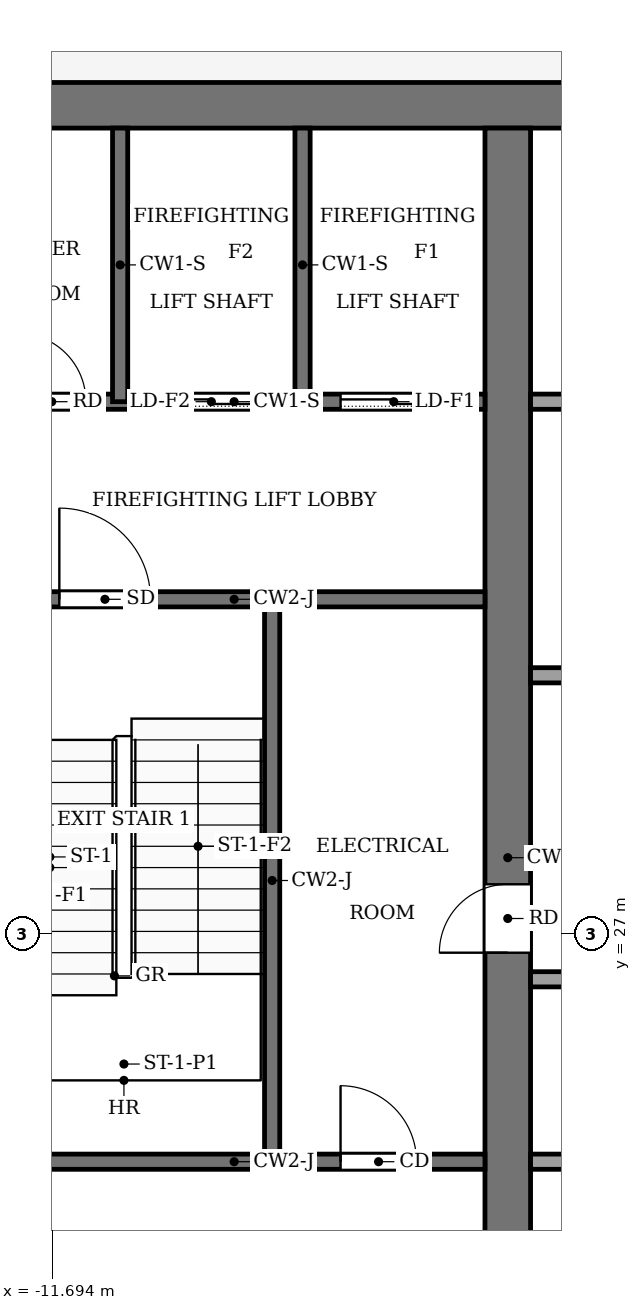
"""IFC4 building model, lengths in metres.
Left out: names, types, materials, properties, quantities, classifications, styles, units other than length and angle.
Written with IfcOpenShell. Run it as: python <this file> out.ifc"""

import sys

from ifc_helpers import new_model, si_unit, direction, frame, frame_2d, origin, place, context, subcontext, project, spatial, rectangle, extrude, element, fill, save


model = new_model("IFC4")
c1 = context("Model", 3, precision=1e-05, world=origin(), true_north=direction((0.0, 1.0)))
c2 = subcontext(c1, "Body", "Model", "MODEL_VIEW")
j1 = project(units=[si_unit("LENGTHUNIT", "METRE"), si_unit("PLANEANGLEUNIT", "RADIAN")], contexts=[c1])
p1 = place(None, origin())
s1 = spatial("IfcSite", under=j1, at=p1, CompositionType="ELEMENT")
p2 = place(p1, origin())
s2 = spatial("IfcBuilding", under=s1, at=p2, CompositionType="ELEMENT")
p3 = place(p2, frame((0.0, 0.0, 359.5)))
s3 = spatial("IfcBuildingStorey", under=s2, at=p3, CompositionType="ELEMENT", Elevation=359.5)
p4 = place(p3, frame((-13.2, 37.9, -0.15), z_axis=(0.0, 0.0, 1.0), x_axis=(1.0, 0.0, 0.0)))
e1 = element("IfcWall", 1, at=p4, inside=s3, PredefinedType="SHEAR", context=c2, shape_type="SweptSolid", body=[
    extrude(rectangle(XDim=26.4, YDim=0.6, at=frame_2d((13.2, 0.0))), origin(), (0.0, 0.0, 1.0), 4.5),
])
p5 = place(p3, frame((-5.7, 18.4, -0.15), z_axis=(0.0, 0.0, 1.0), x_axis=(0.0, 1.0, 0.0)))
e2 = element("IfcWall", 2, at=p5, inside=s3, PredefinedType="SHEAR", context=c2, shape_type="SweptSolid", body=[
    extrude(rectangle(XDim=19.2, YDim=0.6, at=frame_2d((9.6, 0.0))), origin(), (0.0, 0.0, 1.0), 4.5),
])
p6 = place(p5, frame((8.35, 0.0, 0.15)))
e3 = element("IfcOpeningElement", 3, at=p6, cuts=e2, PredefinedType="OPENING", context=c2, shape_type="SweptSolid", body=[
    extrude(rectangle(XDim=0.9, YDim=2.1, at=frame_2d((0.45, 1.05))), frame((0.0, 0.31, 0.0), z_axis=(0.0, -1.0, 0.0), x_axis=(1.0, 0.0, 0.0)), (0.0, 0.0, 1.0), 0.62),
])
p7 = place(p3, frame((-12.6, 24.0, 0.0), z_axis=(0.0, 0.0, 1.0), x_axis=(1.0, 0.0, 0.0)))
e4 = element("IfcWall", 4, at=p7, inside=s3, PredefinedType="PARTITIONING", context=c2, shape_type="SweptSolid", body=[
    extrude(rectangle(XDim=6.6, YDim=0.2, at=frame_2d((3.3, 0.0))), origin(), (0.0, 0.0, 1.0), 4.35),
])
p8 = place(p7, frame((4.7, 0.0, 0.0)))
e5 = element("IfcOpeningElement", 5, at=p8, cuts=e4, PredefinedType="OPENING", context=c2, shape_type="SweptSolid", body=[
    extrude(rectangle(XDim=1.0, YDim=2.1, at=frame_2d((0.5, 1.05))), frame((0.0, 0.11, 0.0), z_axis=(0.0, -1.0, 0.0), x_axis=(1.0, 0.0, 0.0)), (0.0, 0.0, 1.0), 0.22),
])
p9 = place(p3, frame((-5.4, 24.0, 0.0), z_axis=(0.0, 0.0, 1.0), x_axis=(1.0, 0.0, 0.0)))
e6 = element("IfcWall", 6, at=p9, inside=s3, PredefinedType="PARTITIONING", context=c2, shape_type="SweptSolid", body=[
    extrude(rectangle(XDim=10.8, YDim=0.2, at=frame_2d((5.4, 0.0))), origin(), (0.0, 0.0, 1.0), 4.35),
])
p10 = place(p9, frame((4.9, 0.0, 0.0)))
e7 = element("IfcOpeningElement", 7, at=p10, cuts=e6, PredefinedType="OPENING", context=c2, shape_type="SweptSolid", body=[
    extrude(rectangle(XDim=1.0, YDim=2.1, at=frame_2d((0.5, 1.05))), frame((0.0, 0.11, 0.0), z_axis=(0.0, -1.0, 0.0), x_axis=(1.0, 0.0, 0.0)), (0.0, 0.0, 1.0), 0.22),
])
for number, where, z_axis, x_axis in (
    (8, (-5.4, 26.4, 0.0), (0.0, 0.0, 1.0), (1.0, 0.0, 0.0)),
    (9, (-5.4, 28.0, 0.0), (0.0, 0.0, 1.0), (1.0, 0.0, 0.0)),
):
    element("IfcWall", number, at=place(p3, frame(where, z_axis=z_axis, x_axis=x_axis)), inside=s3, PredefinedType="PARTITIONING", context=c2, shape_type="SweptSolid", body=[
        extrude(rectangle(XDim=10.8, YDim=0.2, at=frame_2d((5.4, 0.0))), origin(), (0.0, 0.0, 1.0), 4.35),
    ])
p11 = place(p3, frame((-5.4, 30.4, 0.0), z_axis=(0.0, 0.0, 1.0), x_axis=(1.0, 0.0, 0.0)))
e10 = element("IfcWall", 10, at=p11, inside=s3, PredefinedType="PARTITIONING", context=c2, shape_type="SweptSolid", body=[
    extrude(rectangle(XDim=10.8, YDim=0.2, at=frame_2d((5.4, 0.0))), origin(), (0.0, 0.0, 1.0), 4.35),
])
p12 = place(p11, frame((4.9, 0.0, 0.0)))
e11 = element("IfcOpeningElement", 11, at=p12, cuts=e10, PredefinedType="OPENING", context=c2, shape_type="SweptSolid", body=[
    extrude(rectangle(XDim=1.0, YDim=2.1, at=frame_2d((0.5, 1.05))), frame((0.0, 0.11, 0.0), z_axis=(0.0, -1.0, 0.0), x_axis=(1.0, 0.0, 0.0)), (0.0, 0.0, 1.0), 0.22),
])
p13 = place(p3, frame((-12.6, 31.4, 0.0), z_axis=(0.0, 0.0, 1.0), x_axis=(1.0, 0.0, 0.0)))
e12 = element("IfcWall", 12, at=p13, inside=s3, PredefinedType="PARTITIONING", context=c2, shape_type="SweptSolid", body=[
    extrude(rectangle(XDim=6.6, YDim=0.2, at=frame_2d((3.3, 0.0))), origin(), (0.0, 0.0, 1.0), 4.35),
])
p14 = place(p13, frame((1.0, 0.0, 0.0)))
e13 = element("IfcOpeningElement", 13, at=p14, cuts=e12, PredefinedType="OPENING", context=c2, shape_type="SweptSolid", body=[
    extrude(rectangle(XDim=1.2, YDim=2.2, at=frame_2d((0.6, 1.1))), frame((0.0, 0.11, 0.0), z_axis=(0.0, -1.0, 0.0), x_axis=(1.0, 0.0, 0.0)), (0.0, 0.0, 1.0), 0.22),
])
p15 = place(p3, frame((-12.6, 34.0, 0.0), z_axis=(0.0, 0.0, 1.0), x_axis=(1.0, 0.0, 0.0)))
e14 = element("IfcWall", 14, at=p15, inside=s3, PredefinedType="PARTITIONING", context=c2, shape_type="SweptSolid", body=[
    extrude(rectangle(XDim=6.6, YDim=0.2, at=frame_2d((3.3, 0.0))), origin(), (0.0, 0.0, 1.0), 4.35),
])
p16 = place(p15, frame((4.7, 0.0, 0.0)))
e15 = element("IfcOpeningElement", 15, at=p16, cuts=e14, PredefinedType="OPENING", context=c2, shape_type="SweptSolid", body=[
    extrude(rectangle(XDim=1.4, YDim=2.2, at=frame_2d((0.7, 1.1))), frame((0.0, 0.11, 0.0), z_axis=(0.0, -1.0, 0.0), x_axis=(1.0, 0.0, 0.0)), (0.0, 0.0, 1.0), 0.22),
])
p17 = place(p15, frame((2.3, 0.0, 0.0)))
e16 = element("IfcOpeningElement", 16, at=p17, cuts=e14, PredefinedType="OPENING", context=c2, shape_type="SweptSolid", body=[
    extrude(rectangle(XDim=1.4, YDim=2.2, at=frame_2d((0.7, 1.1))), frame((0.0, 0.11, 0.0), z_axis=(0.0, -1.0, 0.0), x_axis=(1.0, 0.0, 0.0)), (0.0, 0.0, 1.0), 0.22),
])
p18 = place(p15, frame((0.45, 0.0, 0.0)))
e17 = element("IfcOpeningElement", 17, at=p18, cuts=e14, PredefinedType="OPENING", context=c2, shape_type="SweptSolid", body=[
    extrude(rectangle(XDim=0.9, YDim=2.1, at=frame_2d((0.45, 1.05))), frame((0.0, 0.11, 0.0), z_axis=(0.0, -1.0, 0.0), x_axis=(1.0, 0.0, 0.0)), (0.0, 0.0, 1.0), 0.22),
])
p19 = place(p3, frame((-5.4, 34.0, 0.0), z_axis=(0.0, 0.0, 1.0), x_axis=(1.0, 0.0, 0.0)))
e18 = element("IfcWall", 18, at=p19, inside=s3, PredefinedType="PARTITIONING", context=c2, shape_type="SweptSolid", body=[
    extrude(rectangle(XDim=10.8, YDim=0.2, at=frame_2d((5.4, 0.0))), origin(), (0.0, 0.0, 1.0), 4.35),
])
p20 = place(p19, frame((3.55, 0.0, 0.0)))
e19 = element("IfcOpeningElement", 19, at=p20, cuts=e18, PredefinedType="OPENING", context=c2, shape_type="SweptSolid", body=[
    extrude(rectangle(XDim=1.0, YDim=2.1, at=frame_2d((0.5, 1.05))), frame((0.0, 0.11, 0.0), z_axis=(0.0, -1.0, 0.0), x_axis=(1.0, 0.0, 0.0)), (0.0, 0.0, 1.0), 0.22),
])
p21 = place(p19, frame((8.95, 0.0, 0.0)))
e20 = element("IfcOpeningElement", 20, at=p21, cuts=e18, PredefinedType="OPENING", context=c2, shape_type="SweptSolid", body=[
    extrude(rectangle(XDim=1.0, YDim=2.1, at=frame_2d((0.5, 1.05))), frame((0.0, 0.11, 0.0), z_axis=(0.0, -1.0, 0.0), x_axis=(1.0, 0.0, 0.0)), (0.0, 0.0, 1.0), 0.22),
])
p22 = place(p3, frame((-10.8, 34.0, 0.0), z_axis=(0.0, 0.0, 1.0), x_axis=(0.0, 1.0, 0.0)))
e21 = element("IfcWall", 21, at=p22, inside=s3, PredefinedType="PARTITIONING", context=c2, shape_type="SweptSolid", body=[
    extrude(rectangle(XDim=3.6, YDim=0.2, at=frame_2d((1.8, 0.0))), origin(), (0.0, 0.0, 1.0), 4.35),
])
p23 = place(p3, frame((-8.8, 24.0, 0.0), z_axis=(0.0, 0.0, 1.0), x_axis=(0.0, 1.0, 0.0)))
e22 = element("IfcWall", 22, at=p23, inside=s3, PredefinedType="PARTITIONING", context=c2, shape_type="SweptSolid", body=[
    extrude(rectangle(XDim=7.4, YDim=0.2, at=frame_2d((3.7, 0.0))), origin(), (0.0, 0.0, 1.0), 4.35),
])
p24 = place(p3, frame((-8.4, 34.0, 0.0), z_axis=(0.0, 0.0, 1.0), x_axis=(0.0, 1.0, 0.0)))
e23 = element("IfcWall", 23, at=p24, inside=s3, PredefinedType="PARTITIONING", context=c2, shape_type="SweptSolid", body=[
    extrude(rectangle(XDim=3.6, YDim=0.2, at=frame_2d((1.8, 0.0))), origin(), (0.0, 0.0, 1.0), 4.35),
])
p25 = place(p16, origin())
e24 = element("IfcDoor", 24, at=p25, inside=s3, OperationType="SLIDING_TO_LEFT", PredefinedType="DOOR", context=c2, shape_type="SweptSolid", body=[
    extrude(rectangle(XDim=1.4, YDim=2.2, at=frame_2d((0.7, 1.1))), frame((0.0, 0.025, 0.0), z_axis=(0.0, -1.0, 0.0), x_axis=(1.0, 0.0, 0.0)), (0.0, 0.0, 1.0), 0.05),
])
fill(e15, e24)
p26 = place(p17, origin())
e25 = element("IfcDoor", 25, at=p26, inside=s3, OperationType="SLIDING_TO_LEFT", PredefinedType="DOOR", context=c2, shape_type="SweptSolid", body=[
    extrude(rectangle(XDim=1.4, YDim=2.2, at=frame_2d((0.7, 1.1))), frame((0.0, 0.025, 0.0), z_axis=(0.0, -1.0, 0.0), x_axis=(1.0, 0.0, 0.0)), (0.0, 0.0, 1.0), 0.05),
])
fill(e16, e25)
p27 = place(p18, origin())
e26 = element("IfcDoor", 26, at=p27, inside=s3, OperationType="SINGLE_SWING_LEFT", PredefinedType="DOOR", context=c2, shape_type="SweptSolid", body=[
    extrude(rectangle(XDim=0.9, YDim=2.1, at=frame_2d((0.45, 1.05))), frame((0.0, 0.025, 0.0), z_axis=(0.0, -1.0, 0.0), x_axis=(1.0, 0.0, 0.0)), (0.0, 0.0, 1.0), 0.05),
])
fill(e17, e26)
p28 = place(p8, origin())
e27 = element("IfcDoor", 27, at=p28, inside=s3, OperationType="SINGLE_SWING_LEFT", PredefinedType="DOOR", context=c2, shape_type="SweptSolid", body=[
    extrude(rectangle(XDim=1.0, YDim=2.1, at=frame_2d((0.5, 1.05))), frame((0.0, 0.025, 0.0), z_axis=(0.0, -1.0, 0.0), x_axis=(1.0, 0.0, 0.0)), (0.0, 0.0, 1.0), 0.05),
])
fill(e5, e27)
p29 = place(p6, origin())
e28 = element("IfcDoor", 28, at=p29, inside=s3, OperationType="SINGLE_SWING_LEFT", PredefinedType="DOOR", context=c2, shape_type="SweptSolid", body=[
    extrude(rectangle(XDim=0.9, YDim=2.1, at=frame_2d((0.45, 1.05))), frame((0.0, 0.025, 0.0), z_axis=(0.0, -1.0, 0.0), x_axis=(1.0, 0.0, 0.0)), (0.0, 0.0, 1.0), 0.05),
])
fill(e3, e28)
p30 = place(p14, origin())
e29 = element("IfcDoor", 29, at=p30, inside=s3, OperationType="SINGLE_SWING_LEFT", PredefinedType="DOOR", context=c2, shape_type="SweptSolid", body=[
    extrude(rectangle(XDim=1.2, YDim=2.2, at=frame_2d((0.6, 1.1))), frame((0.0, 0.025, 0.0), z_axis=(0.0, -1.0, 0.0), x_axis=(1.0, 0.0, 0.0)), (0.0, 0.0, 1.0), 0.05),
])
fill(e13, e29)
save(model, sys.argv[1])
